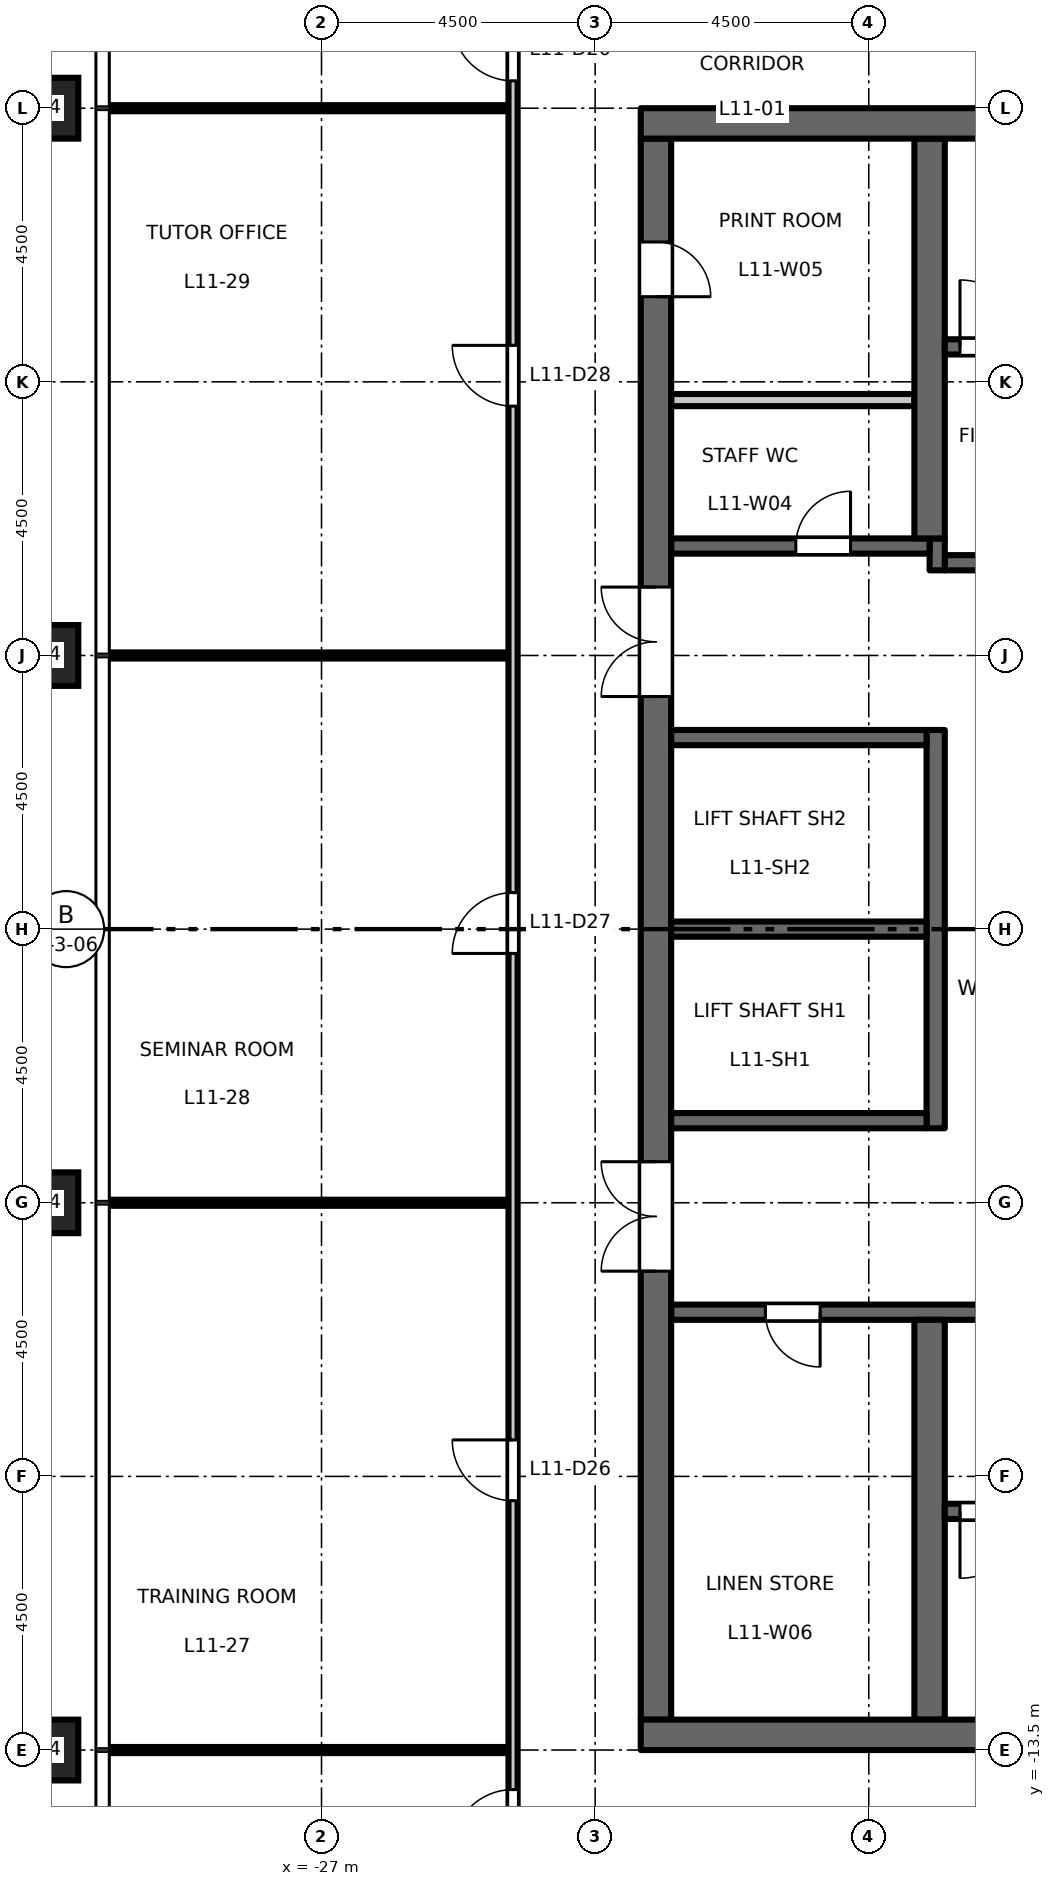
"""IFC4 building model, lengths in metres.
Left out: names, types, materials, properties, quantities, classifications, styles, units other than length and angle.
Written with IfcOpenShell. Run it as: python <this file> out.ifc"""

import sys

from ifc_helpers import new_model, si_unit, direction, frame, frame_2d, origin, origin_2d, place, context, subcontext, project, spatial, rectangle, hollow_rectangle, extrude, element, fill, save


model = new_model("IFC4")
c1 = context("Model", 3, precision=1e-05, world=origin(), true_north=direction((0.0, 1.0)))
c2 = subcontext(c1, "Body", "Model", "MODEL_VIEW")
j1 = project(units=[si_unit("LENGTHUNIT", "METRE"), si_unit("PLANEANGLEUNIT", "RADIAN")], contexts=[c1])
p1 = place(None, origin())
s1 = spatial("IfcSite", under=j1, at=p1, CompositionType="ELEMENT")
p2 = place(p1, origin())
s2 = spatial("IfcBuilding", under=s1, at=p2, CompositionType="ELEMENT")
p3 = place(p2, frame((0.0, 0.0, 53.7)))
s3 = spatial("IfcBuildingStorey", under=s2, at=p3, CompositionType="ELEMENT", Elevation=53.7)
for number, where, z_axis, x_axis in (
    (1, (-31.5, 13.5, 0.0), (0.0, 0.0, 1.0), (1.0, 0.0, 0.0)),
    (2, (-31.5, 4.5, 0.0), (0.0, 0.0, 1.0), (1.0, 0.0, 0.0)),
    (3, (-31.5, -4.5, 0.0), (0.0, 0.0, 1.0), (1.0, 0.0, 0.0)),
    (4, (-31.5, -13.5, 0.0), (0.0, 0.0, 1.0), (1.0, 0.0, 0.0)),
):
    element("IfcColumn", number, at=place(p3, frame(where, z_axis=z_axis, x_axis=x_axis)), inside=s3, PredefinedType="COLUMN", context=c2, shape_type="SweptSolid", body=[
        extrude(hollow_rectangle(XDim=1.0, YDim=1.0, WallThickness=0.06, at=origin_2d()), origin(), (0.0, 0.0, 1.0), 4.5),
    ])
p4 = place(p3, frame((-12.15, 6.025, 0.0), z_axis=(0.0, 0.0, 1.0), x_axis=(-1.0, 0.0, 0.0)))
e5 = element("IfcWall", 5, at=p4, inside=s3, PredefinedType="SHEAR", context=c2, shape_type="SweptSolid", body=[
    extrude(rectangle(XDim=4.6, YDim=0.25, at=frame_2d((2.3, 0.0))), origin(), (0.0, 0.0, 1.0), 4.35),
])
p5 = place(p4, frame((1.8, 0.0, 0.0)))
e6 = element("IfcOpeningElement", 6, at=p5, cuts=e5, PredefinedType="OPENING", context=c2, shape_type="SweptSolid", body=[
    extrude(rectangle(XDim=1.0, YDim=2.1, at=frame_2d((0.5, 1.05))), frame((0.0, 0.135, 0.0), z_axis=(0.0, -1.0, 0.0), x_axis=(1.0, 0.0, 0.0)), (0.0, 0.0, 1.0), 0.27),
])
p6 = place(p3, frame((-16.875, 5.9, 0.0), z_axis=(0.0, 0.0, 1.0), x_axis=(0.0, 1.0, 0.0)))
e7 = element("IfcWall", 7, at=p6, inside=s3, PredefinedType="SHEAR", context=c2, shape_type="SweptSolid", body=[
    extrude(rectangle(XDim=0.525, YDim=0.25, at=frame_2d((0.263, 0.0))), origin(), (0.0, 0.0, 1.0), 4.35),
])
p7 = place(p3, frame((-17.0, 6.3, 0.0), z_axis=(0.0, 0.0, 1.0), x_axis=(-1.0, 0.0, 0.0)))
e8 = element("IfcWall", 8, at=p7, inside=s3, PredefinedType="SHEAR", context=c2, shape_type="SweptSolid", body=[
    extrude(rectangle(XDim=4.25, YDim=0.25, at=frame_2d((2.125, 0.0))), origin(), (0.0, 0.0, 1.0), 4.35),
])
p8 = place(p7, frame((1.3, 0.0, 0.0)))
e9 = element("IfcOpeningElement", 9, at=p8, cuts=e8, PredefinedType="OPENING", context=c2, shape_type="SweptSolid", body=[
    extrude(rectangle(XDim=0.9, YDim=2.1, at=frame_2d((0.45, 1.05))), frame((0.0, 0.135, 0.0), z_axis=(0.0, -1.0, 0.0), x_axis=(1.0, 0.0, 0.0)), (0.0, 0.0, 1.0), 0.27),
])
p9 = place(p3, frame((-12.15, -6.3, 0.0), z_axis=(0.0, 0.0, 1.0), x_axis=(-1.0, 0.0, 0.0)))
e10 = element("IfcWall", 10, at=p9, inside=s3, PredefinedType="SHEAR", context=c2, shape_type="SweptSolid", body=[
    extrude(rectangle(XDim=9.1, YDim=0.25, at=frame_2d((4.55, 0.0))), origin(), (0.0, 0.0, 1.0), 4.35),
])
p10 = place(p9, frame((1.8, 0.0, 0.0)))
e11 = element("IfcOpeningElement", 11, at=p10, cuts=e10, PredefinedType="OPENING", context=c2, shape_type="SweptSolid", body=[
    extrude(rectangle(XDim=1.0, YDim=2.1, at=frame_2d((0.5, 1.05))), frame((0.0, 0.135, 0.0), z_axis=(0.0, -1.0, 0.0), x_axis=(1.0, 0.0, 0.0)), (0.0, 0.0, 1.0), 0.27),
])
p11 = place(p9, frame((6.65, 0.0, 0.0)))
e12 = element("IfcOpeningElement", 12, at=p11, cuts=e10, PredefinedType="OPENING", context=c2, shape_type="SweptSolid", body=[
    extrude(rectangle(XDim=0.9, YDim=2.1, at=frame_2d((0.45, 1.05))), frame((0.0, 0.135, 0.0), z_axis=(0.0, -1.0, 0.0), x_axis=(1.0, 0.0, 0.0)), (0.0, 0.0, 1.0), 0.27),
])
p12 = place(p3, frame((-21.5, -13.0, 0.0), z_axis=(0.0, 0.0, 1.0), x_axis=(0.0, 1.0, 0.0)))
e13 = element("IfcWall", 13, at=p12, inside=s3, PredefinedType="SHEAR", context=c2, shape_type="SweptSolid", body=[
    extrude(rectangle(XDim=26.0, YDim=0.5, at=frame_2d((13.0, 0.0))), origin(), (0.0, 0.0, 1.0), 4.35),
])
p13 = place(p12, frame((16.825, 0.0, 0.0)))
e14 = element("IfcOpeningElement", 14, at=p13, cuts=e13, PredefinedType="OPENING", context=c2, shape_type="SweptSolid", body=[
    extrude(rectangle(XDim=1.8, YDim=2.1, at=frame_2d((0.9, 1.05))), frame((0.0, 0.26, 0.0), z_axis=(0.0, -1.0, 0.0), x_axis=(1.0, 0.0, 0.0)), (0.0, 0.0, 1.0), 0.52),
])
p14 = place(p12, frame((7.375, 0.0, 0.0)))
e15 = element("IfcOpeningElement", 15, at=p14, cuts=e13, PredefinedType="OPENING", context=c2, shape_type="SweptSolid", body=[
    extrude(rectangle(XDim=1.8, YDim=2.1, at=frame_2d((0.9, 1.05))), frame((0.0, 0.26, 0.0), z_axis=(0.0, -1.0, 0.0), x_axis=(1.0, 0.0, 0.0)), (0.0, 0.0, 1.0), 0.52),
])
p15 = place(p12, frame((23.4, 0.0, 0.0)))
e16 = element("IfcOpeningElement", 16, at=p15, cuts=e13, PredefinedType="OPENING", context=c2, shape_type="SweptSolid", body=[
    extrude(rectangle(XDim=0.9, YDim=2.1, at=frame_2d((0.45, 1.05))), frame((0.0, 0.26, 0.0), z_axis=(0.0, -1.0, 0.0), x_axis=(1.0, 0.0, 0.0)), (0.0, 0.0, 1.0), 0.52),
])
p16 = place(p3, frame((-17.25, 8.7, 0.0), z_axis=(0.0, 0.0, 1.0), x_axis=(-1.0, 0.0, 0.0)))
e17 = element("IfcWall", 17, at=p16, inside=s3, PredefinedType="PARTITIONING", context=c2, shape_type="SweptSolid", body=[
    extrude(rectangle(XDim=4.0, YDim=0.2, at=frame_2d((2.0, 0.0))), origin(), (0.0, 0.0, 1.0), 4.35),
])
p17 = place(p3, frame((-16.9, -3.275, 0.0), z_axis=(0.0, 0.0, 1.0), x_axis=(0.0, 1.0, 0.0)))
e18 = element("IfcWall", 18, at=p17, inside=s3, PredefinedType="SHEAR", context=c2, shape_type="SweptSolid", body=[
    extrude(rectangle(XDim=6.55, YDim=0.3, at=frame_2d((3.275, 0.0))), origin(), (0.0, 0.0, 1.0), 4.35),
])
for number, where, z_axis, x_axis in (
    (19, (-17.05, 0.0, 0.0), (0.0, 0.0, 1.0), (-1.0, 0.0, 0.0)),
    (20, (-17.05, 3.15, 0.0), (0.0, 0.0, 1.0), (-1.0, 0.0, 0.0)),
    (21, (-17.05, -3.15, 0.0), (0.0, 0.0, 1.0), (-1.0, 0.0, 0.0)),
):
    element("IfcWall", number, at=place(p3, frame(where, z_axis=z_axis, x_axis=x_axis)), inside=s3, PredefinedType="SHEAR", context=c2, shape_type="SweptSolid", body=[
        extrude(rectangle(XDim=4.2, YDim=0.25, at=frame_2d((2.1, 0.0))), origin(), (0.0, 0.0, 1.0), 4.35),
    ])
for number, where, z_axis, x_axis in (
    (22, (-17.0, 6.425, 0.0), (0.0, 0.0, 1.0), (0.0, 1.0, 0.0)),
    (23, (-17.0, -13.0, 0.0), (0.0, 0.0, 1.0), (0.0, 1.0, 0.0)),
):
    element("IfcWall", number, at=place(p3, frame(where, z_axis=z_axis, x_axis=x_axis)), inside=s3, PredefinedType="SHEAR", context=c2, shape_type="SweptSolid", body=[
        extrude(rectangle(XDim=6.575, YDim=0.5, at=frame_2d((3.288, 0.0))), origin(), (0.0, 0.0, 1.0), 4.35),
    ])
p18 = place(p3, frame((-8.75, 9.575, 0.0), z_axis=(0.0, 0.0, 1.0), x_axis=(-1.0, 0.0, 0.0)))
e24 = element("IfcWall", 24, at=p18, inside=s3, PredefinedType="SHEAR", context=c2, shape_type="SweptSolid", body=[
    extrude(rectangle(XDim=8.0, YDim=0.25, at=frame_2d((4.0, 0.0))), origin(), (0.0, 0.0, 1.0), 4.35),
])
p19 = place(p18, frame((6.65, 0.0, 0.0)))
e25 = element("IfcOpeningElement", 25, at=p19, cuts=e24, PredefinedType="OPENING", context=c2, shape_type="SweptSolid", body=[
    extrude(rectangle(XDim=1.1, YDim=2.1, at=frame_2d((0.55, 1.05))), frame((0.0, 0.135, 0.0), z_axis=(0.0, -1.0, 0.0), x_axis=(1.0, 0.0, 0.0)), (0.0, 0.0, 1.0), 0.27),
])
p20 = place(p3, frame((-8.75, -9.575, 0.0), z_axis=(0.0, 0.0, 1.0), x_axis=(-1.0, 0.0, 0.0)))
e26 = element("IfcWall", 26, at=p20, inside=s3, PredefinedType="SHEAR", context=c2, shape_type="SweptSolid", body=[
    extrude(rectangle(XDim=8.0, YDim=0.25, at=frame_2d((4.0, 0.0))), origin(), (0.0, 0.0, 1.0), 4.35),
])
p21 = place(p20, frame((6.65, 0.0, 0.0)))
e27 = element("IfcOpeningElement", 27, at=p21, cuts=e26, PredefinedType="OPENING", context=c2, shape_type="SweptSolid", body=[
    extrude(rectangle(XDim=1.1, YDim=2.1, at=frame_2d((0.55, 1.05))), frame((0.0, 0.135, 0.0), z_axis=(0.0, -1.0, 0.0), x_axis=(1.0, 0.0, 0.0)), (0.0, 0.0, 1.0), 0.27),
])
for number, where, z_axis, x_axis in (
    (28, (-8.25, 13.25, 0.0), (0.0, 0.0, 1.0), (-1.0, 0.0, 0.0)),
    (29, (-8.25, -13.25, 0.0), (0.0, 0.0, 1.0), (-1.0, 0.0, 0.0)),
):
    element("IfcWall", number, at=place(p3, frame(where, z_axis=z_axis, x_axis=x_axis)), inside=s3, PredefinedType="SHEAR", context=c2, shape_type="SweptSolid", body=[
        extrude(rectangle(XDim=13.5, YDim=0.5, at=frame_2d((6.75, 0.0))), origin(), (0.0, 0.0, 1.0), 4.35),
    ])
p22 = place(p3, frame((-30.51, -13.5, 0.0), z_axis=(0.0, 0.0, 1.0), x_axis=(1.0, 0.0, 0.0)))
e30 = element("IfcWall", 30, at=p22, inside=s3, PredefinedType="PARTITIONING", context=c2, shape_type="SweptSolid", body=[
    extrude(rectangle(XDim=6.585, YDim=0.1, at=frame_2d((3.292, 0.0))), origin(), (0.0, 0.0, 1.0), 3.35),
])
for number, where, z_axis, x_axis in (
    (31, (-30.51, -4.5, 0.0), (0.0, 0.0, 1.0), (1.0, 0.0, 0.0)),
    (32, (-30.51, 4.5, 0.0), (0.0, 0.0, 1.0), (1.0, 0.0, 0.0)),
):
    element("IfcWall", number, at=place(p3, frame(where, z_axis=z_axis, x_axis=x_axis)), inside=s3, PredefinedType="PARTITIONING", context=c2, shape_type="SweptSolid", body=[
        extrude(rectangle(XDim=6.585, YDim=0.1, at=frame_2d((3.292, 0.0))), origin(), (0.0, 0.0, 1.0), 4.35),
    ])
p23 = place(p3, frame((-30.51, 13.5, 0.0), z_axis=(0.0, 0.0, 1.0), x_axis=(1.0, 0.0, 0.0)))
e33 = element("IfcWall", 33, at=p23, inside=s3, PredefinedType="PARTITIONING", context=c2, shape_type="SweptSolid", body=[
    extrude(rectangle(XDim=6.585, YDim=0.1, at=frame_2d((3.292, 0.0))), origin(), (0.0, 0.0, 1.0), 3.35),
])
p24 = place(p3, frame((-23.85, -15.525, 0.0), z_axis=(0.0, 0.0, 1.0), x_axis=(0.0, 1.0, 0.0)))
e34 = element("IfcWall", 34, at=p24, inside=s3, PredefinedType="PARTITIONING", context=c2, shape_type="SweptSolid", body=[
    extrude(rectangle(XDim=31.05, YDim=0.15, at=frame_2d((15.525, 0.0))), origin(), (0.0, 0.0, 1.0), 4.35),
])
p25 = place(p24, frame((29.475, 0.0, 0.0)))
e35 = element("IfcOpeningElement", 35, at=p25, cuts=e34, PredefinedType="OPENING", context=c2, shape_type="SweptSolid", body=[
    extrude(rectangle(XDim=1.0, YDim=2.1, at=frame_2d((0.5, 1.05))), frame((0.0, 0.085, 0.0), z_axis=(0.0, -1.0, 0.0), x_axis=(1.0, 0.0, 0.0)), (0.0, 0.0, 1.0), 0.17),
])
p26 = place(p24, frame((0.375, 0.0, 0.0)))
e36 = element("IfcOpeningElement", 36, at=p26, cuts=e34, PredefinedType="OPENING", context=c2, shape_type="SweptSolid", body=[
    extrude(rectangle(XDim=1.0, YDim=2.1, at=frame_2d((0.5, 1.05))), frame((0.0, 0.085, 0.0), z_axis=(0.0, -1.0, 0.0), x_axis=(1.0, 0.0, 0.0)), (0.0, 0.0, 1.0), 0.17),
])
p27 = place(p24, frame((6.125, 0.0, 0.0)))
e37 = element("IfcOpeningElement", 37, at=p27, cuts=e34, PredefinedType="OPENING", context=c2, shape_type="SweptSolid", body=[
    extrude(rectangle(XDim=1.0, YDim=2.1, at=frame_2d((0.5, 1.05))), frame((0.0, 0.085, 0.0), z_axis=(0.0, -1.0, 0.0), x_axis=(1.0, 0.0, 0.0)), (0.0, 0.0, 1.0), 0.17),
])
p28 = place(p24, frame((15.125, 0.0, 0.0)))
e38 = element("IfcOpeningElement", 38, at=p28, cuts=e34, PredefinedType="OPENING", context=c2, shape_type="SweptSolid", body=[
    extrude(rectangle(XDim=1.0, YDim=2.1, at=frame_2d((0.5, 1.05))), frame((0.0, 0.085, 0.0), z_axis=(0.0, -1.0, 0.0), x_axis=(1.0, 0.0, 0.0)), (0.0, 0.0, 1.0), 0.17),
])
p29 = place(p24, frame((24.125, 0.0, 0.0)))
e39 = element("IfcOpeningElement", 39, at=p29, cuts=e34, PredefinedType="OPENING", context=c2, shape_type="SweptSolid", body=[
    extrude(rectangle(XDim=1.0, YDim=2.1, at=frame_2d((0.5, 1.05))), frame((0.0, 0.085, 0.0), z_axis=(0.0, -1.0, 0.0), x_axis=(1.0, 0.0, 0.0)), (0.0, 0.0, 1.0), 0.17),
])
p30 = place(p19, origin())
e40 = element("IfcDoor", 40, at=p30, inside=s3, OperationType="SINGLE_SWING_RIGHT", PredefinedType="DOOR", context=c2, shape_type="SweptSolid", body=[
    extrude(rectangle(XDim=1.1, YDim=2.1, at=frame_2d((0.55, 1.05))), frame((0.0, 0.025, 0.0), z_axis=(0.0, -1.0, 0.0), x_axis=(1.0, 0.0, 0.0)), (0.0, 0.0, 1.0), 0.05),
])
fill(e25, e40)
p31 = place(p21, origin())
e41 = element("IfcDoor", 41, at=p31, inside=s3, OperationType="SINGLE_SWING_LEFT", PredefinedType="DOOR", context=c2, shape_type="SweptSolid", body=[
    extrude(rectangle(XDim=1.1, YDim=2.1, at=frame_2d((0.55, 1.05))), frame((0.0, 0.025, 0.0), z_axis=(0.0, -1.0, 0.0), x_axis=(1.0, 0.0, 0.0)), (0.0, 0.0, 1.0), 0.05),
])
fill(e27, e41)
p32 = place(p13, origin())
e42 = element("IfcDoor", 42, at=p32, inside=s3, OperationType="DOUBLE_DOOR_DOUBLE_SWING", PredefinedType="DOOR", context=c2, shape_type="SweptSolid", body=[
    extrude(rectangle(XDim=1.8, YDim=2.1, at=frame_2d((0.9, 1.05))), frame((0.0, 0.025, 0.0), z_axis=(0.0, -1.0, 0.0), x_axis=(1.0, 0.0, 0.0)), (0.0, 0.0, 1.0), 0.05),
])
fill(e14, e42)
p33 = place(p14, origin())
e43 = element("IfcDoor", 43, at=p33, inside=s3, OperationType="DOUBLE_DOOR_DOUBLE_SWING", PredefinedType="DOOR", context=c2, shape_type="SweptSolid", body=[
    extrude(rectangle(XDim=1.8, YDim=2.1, at=frame_2d((0.9, 1.05))), frame((0.0, 0.025, 0.0), z_axis=(0.0, -1.0, 0.0), x_axis=(1.0, 0.0, 0.0)), (0.0, 0.0, 1.0), 0.05),
])
fill(e15, e43)
p34 = place(p8, origin())
e44 = element("IfcDoor", 44, at=p34, inside=s3, OperationType="SINGLE_SWING_LEFT", PredefinedType="DOOR", context=c2, shape_type="SweptSolid", body=[
    extrude(rectangle(XDim=0.9, YDim=2.1, at=frame_2d((0.45, 1.05))), frame((0.0, 0.025, 0.0), z_axis=(0.0, -1.0, 0.0), x_axis=(1.0, 0.0, 0.0)), (0.0, 0.0, 1.0), 0.05),
])
fill(e9, e44)
p35 = place(p15, origin())
e45 = element("IfcDoor", 45, at=p35, inside=s3, OperationType="SINGLE_SWING_LEFT", PredefinedType="DOOR", context=c2, shape_type="SweptSolid", body=[
    extrude(rectangle(XDim=0.9, YDim=2.1, at=frame_2d((0.45, 1.05))), frame((0.0, 0.025, 0.0), z_axis=(0.0, -1.0, 0.0), x_axis=(1.0, 0.0, 0.0)), (0.0, 0.0, 1.0), 0.05),
])
fill(e16, e45)
p36 = place(p11, origin())
e46 = element("IfcDoor", 46, at=p36, inside=s3, OperationType="SINGLE_SWING_RIGHT", PredefinedType="DOOR", context=c2, shape_type="SweptSolid", body=[
    extrude(rectangle(XDim=0.9, YDim=2.1, at=frame_2d((0.45, 1.05))), frame((0.0, 0.025, 0.0), z_axis=(0.0, -1.0, 0.0), x_axis=(1.0, 0.0, 0.0)), (0.0, 0.0, 1.0), 0.05),
])
fill(e12, e46)
p37 = place(p25, origin())
e47 = element("IfcDoor", 47, at=p37, inside=s3, OperationType="SINGLE_SWING_RIGHT", PredefinedType="DOOR", context=c2, shape_type="SweptSolid", body=[
    extrude(rectangle(XDim=1.0, YDim=2.1, at=frame_2d((0.5, 1.05))), frame((0.0, 0.025, 0.0), z_axis=(0.0, -1.0, 0.0), x_axis=(1.0, 0.0, 0.0)), (0.0, 0.0, 1.0), 0.05),
])
fill(e35, e47)
p38 = place(p26, origin())
e48 = element("IfcDoor", 48, at=p38, inside=s3, OperationType="SINGLE_SWING_LEFT", PredefinedType="DOOR", context=c2, shape_type="SweptSolid", body=[
    extrude(rectangle(XDim=1.0, YDim=2.1, at=frame_2d((0.5, 1.05))), frame((0.0, 0.025, 0.0), z_axis=(0.0, -1.0, 0.0), x_axis=(1.0, 0.0, 0.0)), (0.0, 0.0, 1.0), 0.05),
])
fill(e36, e48)
p39 = place(p27, origin())
e49 = element("IfcDoor", 49, at=p39, inside=s3, OperationType="SINGLE_SWING_RIGHT", PredefinedType="DOOR", context=c2, shape_type="SweptSolid", body=[
    extrude(rectangle(XDim=1.0, YDim=2.1, at=frame_2d((0.5, 1.05))), frame((0.0, 0.025, 0.0), z_axis=(0.0, -1.0, 0.0), x_axis=(1.0, 0.0, 0.0)), (0.0, 0.0, 1.0), 0.05),
])
fill(e37, e49)
p40 = place(p28, origin())
e50 = element("IfcDoor", 50, at=p40, inside=s3, OperationType="SINGLE_SWING_LEFT", PredefinedType="DOOR", context=c2, shape_type="SweptSolid", body=[
    extrude(rectangle(XDim=1.0, YDim=2.1, at=frame_2d((0.5, 1.05))), frame((0.0, 0.025, 0.0), z_axis=(0.0, -1.0, 0.0), x_axis=(1.0, 0.0, 0.0)), (0.0, 0.0, 1.0), 0.05),
])
fill(e38, e50)
p41 = place(p29, origin())
e51 = element("IfcDoor", 51, at=p41, inside=s3, OperationType="SINGLE_SWING_RIGHT", PredefinedType="DOOR", context=c2, shape_type="SweptSolid", body=[
    extrude(rectangle(XDim=1.0, YDim=2.1, at=frame_2d((0.5, 1.05))), frame((0.0, 0.025, 0.0), z_axis=(0.0, -1.0, 0.0), x_axis=(1.0, 0.0, 0.0)), (0.0, 0.0, 1.0), 0.05),
])
fill(e39, e51)
save(model, sys.argv[1])
